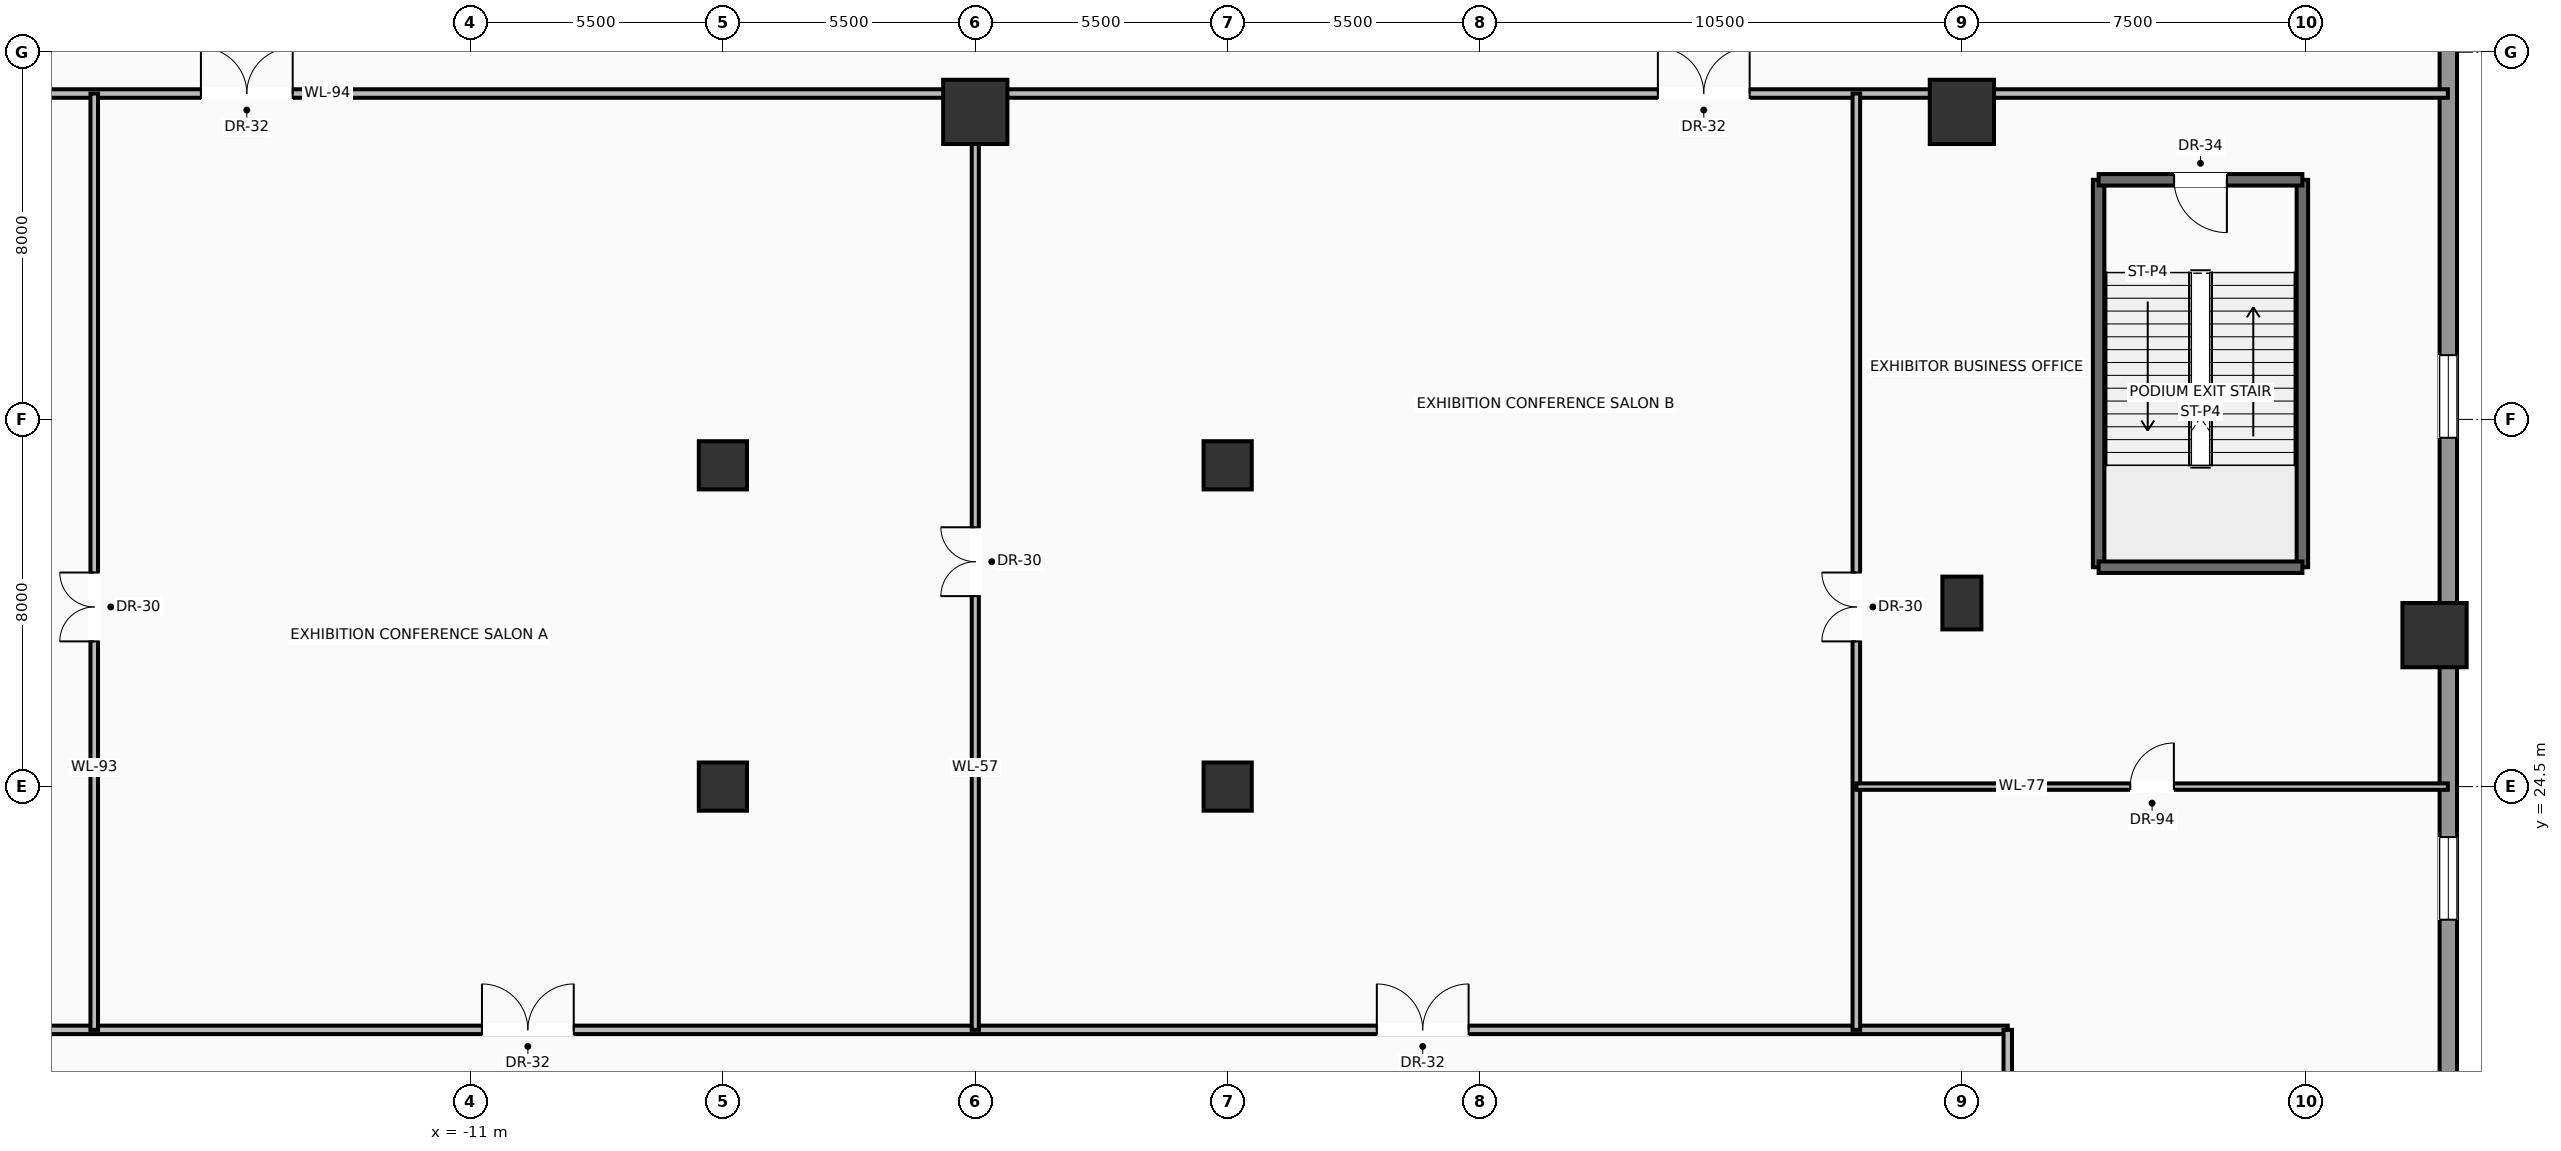
"""IFC4 building model, lengths in metres.
Left out: names, types, materials, properties, quantities, classifications, styles, units other than length and angle.
Written with IfcOpenShell. Run it as: python <this file> out.ifc"""

import sys

from ifc_helpers import new_model, si_unit, direction, frame, frame_2d, origin, origin_2d, place, context, subcontext, project, spatial, rectangle, hollow_rectangle, extrude, source, transform, mapped, element, fill, save


model = new_model("IFC4")
c1 = context("Model", 3, precision=1e-05, world=origin(), true_north=direction((0.0, 1.0)))
c2 = subcontext(c1, "Body", "Model", "MODEL_VIEW")
j1 = project(units=[si_unit("LENGTHUNIT", "METRE"), si_unit("PLANEANGLEUNIT", "RADIAN")], contexts=[c1])
p1 = place(None, origin())
s1 = spatial("IfcSite", under=j1, at=p1, CompositionType="ELEMENT")
p2 = place(p1, origin())
s2 = spatial("IfcBuilding", under=s1, at=p2, CompositionType="ELEMENT")
p3 = place(p2, frame((0.0, 0.0, 11.0)))
s3 = spatial("IfcBuildingStorey", under=s2, at=p3, CompositionType="ELEMENT", Elevation=11.0)
m1 = source(origin(), c2, "Body", "SweptSolid", [
    extrude(rectangle(XDim=1.05, YDim=1.05, at=origin_2d()), origin(), (0.0, 0.0, 1.0), 5.5),
])
for number, where, z_axis, x_axis in (
    (1, (-5.5, 24.5, 0.0), (0.0, 0.0, 1.0), (1.0, 0.0, 0.0)),
    (2, (5.5, 24.5, 0.0), (0.0, 0.0, 1.0), (1.0, 0.0, 0.0)),
    (3, (-5.5, 31.5, 0.0), (0.0, 0.0, 1.0), (1.0, 0.0, 0.0)),
    (4, (5.5, 31.5, 0.0), (0.0, 0.0, 1.0), (1.0, 0.0, 0.0)),
):
    element("IfcColumn", number, at=place(p3, frame(where, z_axis=z_axis, x_axis=x_axis)), inside=s3, PredefinedType="COLUMN", context=c2, shape_type="MappedRepresentation", body=[
        mapped(m1, transform((0.0, 0.0, 0.0), scale=1.0)),
    ])
m2 = source(origin(), c2, "Body", "SweptSolid", [
    extrude(rectangle(XDim=0.85, YDim=1.15, at=origin_2d()), origin(), (0.0, 0.0, 1.0), 5.5),
])
p4 = place(p3, frame((21.5, 28.5, 0.0), z_axis=(0.0, 0.0, 1.0), x_axis=(1.0, 0.0, 0.0)))
e5 = element("IfcColumn", 5, at=p4, inside=s3, PredefinedType="COLUMN", context=c2, shape_type="MappedRepresentation", body=[
    mapped(m2, transform((0.0, 0.0, 0.0), scale=1.0)),
])
m3 = source(origin(), c2, "Body", "SweptSolid", [
    extrude(hollow_rectangle(XDim=1.4, YDim=1.4, WallThickness=0.07, at=origin_2d()), origin(), (0.0, 0.0, 1.0), 5.5),
])
for number, where, z_axis, x_axis in (
    (6, (0.0, 39.2, 0.0), (0.0, 0.0, 1.0), (1.0, 0.0, 0.0)),
    (7, (21.5, 39.2, 0.0), (0.0, 0.0, 1.0), (1.0, 0.0, 0.0)),
    (8, (31.8, 27.8, 0.0), (0.0, 0.0, 1.0), (1.0, 0.0, 0.0)),
):
    element("IfcColumn", number, at=place(p3, frame(where, z_axis=z_axis, x_axis=x_axis)), inside=s3, PredefinedType="COLUMN", context=c2, shape_type="MappedRepresentation", body=[
        mapped(m3, transform((0.0, 0.0, 0.0), scale=1.0)),
    ])
p5 = place(p3, frame((32.1, 41.1, 0.0), z_axis=(0.0, 0.0, 1.0), x_axis=(0.0, -1.0, 0.0)))
e9 = element("IfcWall", 9, at=p5, inside=s3, PredefinedType="SOLIDWALL", context=c2, shape_type="SweptSolid", body=[
    extrude(rectangle(XDim=36.4, YDim=0.38, at=frame_2d((18.2, 0.0))), origin(), (0.0, 0.0, 1.0), 4.125),
])
p6 = place(p5, frame((17.7, 0.0, 0.95)))
e10 = element("IfcOpeningElement", 10, at=p6, cuts=e9, PredefinedType="OPENING", context=c2, shape_type="SweptSolid", body=[
    extrude(rectangle(XDim=1.8, YDim=2.4, at=frame_2d((0.9, 1.2))), frame((0.0, 0.2, 0.0), z_axis=(0.0, -1.0, 0.0), x_axis=(1.0, 0.0, 0.0)), (0.0, 0.0, 1.0), 0.4),
])
p7 = place(p5, frame((7.2, 0.0, 0.95)))
e11 = element("IfcOpeningElement", 11, at=p7, cuts=e9, PredefinedType="OPENING", context=c2, shape_type="SweptSolid", body=[
    extrude(rectangle(XDim=1.8, YDim=2.4, at=frame_2d((0.9, 1.2))), frame((0.0, 0.2, 0.0), z_axis=(0.0, -1.0, 0.0), x_axis=(1.0, 0.0, 0.0)), (0.0, 0.0, 1.0), 0.4),
])
for number, where, z_axis, x_axis in (
    (12, (24.48, 29.28, 0.0), (0.0, 0.0, 1.0), (0.0, 1.0, 0.0)),
    (13, (28.92, 29.28, 0.0), (0.0, 0.0, 1.0), (0.0, 1.0, 0.0)),
):
    element("IfcWall", number, at=place(p3, frame(where, z_axis=z_axis, x_axis=x_axis)), inside=s3, PredefinedType="SOLIDWALL", context=c2, shape_type="SweptSolid", body=[
        extrude(rectangle(XDim=8.44, YDim=0.25, at=frame_2d((4.22, 0.0))), origin(), (0.0, 0.0, 1.0), 5.185),
    ])
p8 = place(p3, frame((24.48, 29.28, 0.0), z_axis=(0.0, 0.0, 1.0), x_axis=(1.0, 0.0, 0.0)))
e14 = element("IfcWall", 14, at=p8, inside=s3, PredefinedType="SOLIDWALL", context=c2, shape_type="SweptSolid", body=[
    extrude(rectangle(XDim=4.44, YDim=0.25, at=frame_2d((2.22, 0.0))), origin(), (0.0, 0.0, 1.0), 5.185),
])
p9 = place(p3, frame((28.92, 37.72, 0.0), z_axis=(0.0, 0.0, 1.0), x_axis=(-1.0, 0.0, 0.0)))
e15 = element("IfcWall", 15, at=p9, inside=s3, PredefinedType="SOLIDWALL", context=c2, shape_type="SweptSolid", body=[
    extrude(rectangle(XDim=4.44, YDim=0.25, at=frame_2d((2.22, 0.0))), origin(), (0.0, 0.0, 1.0), 5.185),
])
p10 = place(p9, frame((1.645, 0.0, 0.0)))
e16 = element("IfcOpeningElement", 16, at=p10, cuts=e15, PredefinedType="OPENING", context=c2, shape_type="SweptSolid", body=[
    extrude(rectangle(XDim=1.15, YDim=2.2, at=frame_2d((0.575, 1.1))), frame((0.0, 0.135, 0.0), z_axis=(0.0, -1.0, 0.0), x_axis=(1.0, 0.0, 0.0)), (0.0, 0.0, 1.0), 0.27),
])
p11 = place(p3, frame((-32.09, 39.6, 0.0), z_axis=(0.0, 0.0, 1.0), x_axis=(1.0, 0.0, 0.0)))
e17 = element("IfcWall", 17, at=p11, inside=s3, PredefinedType="PARTITIONING", context=c2, shape_type="SweptSolid", body=[
    extrude(rectangle(XDim=64.18, YDim=0.185, at=frame_2d((32.09, 0.0))), origin(), (0.0, 0.0, 1.0), 4.137),
])
p12 = place(p11, frame((15.215, 0.0, 0.0)))
e18 = element("IfcOpeningElement", 18, at=p12, cuts=e17, PredefinedType="OPENING", context=c2, shape_type="SweptSolid", body=[
    extrude(rectangle(XDim=2.0, YDim=2.4, at=frame_2d((1.0, 1.2))), frame((0.0, 0.103, 0.0), z_axis=(0.0, -1.0, 0.0), x_axis=(1.0, 0.0, 0.0)), (0.0, 0.0, 1.0), 0.205),
])
p13 = place(p11, frame((46.965, 0.0, 0.0)))
e19 = element("IfcOpeningElement", 19, at=p13, cuts=e17, PredefinedType="OPENING", context=c2, shape_type="SweptSolid", body=[
    extrude(rectangle(XDim=2.0, YDim=2.4, at=frame_2d((1.0, 1.2))), frame((0.0, 0.103, 0.0), z_axis=(0.0, -1.0, 0.0), x_axis=(1.0, 0.0, 0.0)), (0.0, 0.0, 1.0), 0.205),
])
p14 = place(p3, frame((-22.5, 19.2, 0.0), z_axis=(0.0, 0.0, 1.0), x_axis=(1.0, 0.0, 0.0)))
e20 = element("IfcWall", 20, at=p14, inside=s3, PredefinedType="PARTITIONING", context=c2, shape_type="SweptSolid", body=[
    extrude(rectangle(XDim=45.0, YDim=0.185, at=frame_2d((22.5, 0.0))), origin(), (0.0, 0.0, 1.0), 4.137),
])
p15 = place(p14, frame((11.75, 0.0, 0.0)))
e21 = element("IfcOpeningElement", 21, at=p15, cuts=e20, PredefinedType="OPENING", context=c2, shape_type="SweptSolid", body=[
    extrude(rectangle(XDim=2.0, YDim=2.4, at=frame_2d((1.0, 1.2))), frame((0.0, 0.103, 0.0), z_axis=(0.0, -1.0, 0.0), x_axis=(1.0, 0.0, 0.0)), (0.0, 0.0, 1.0), 0.205),
])
p16 = place(p14, frame((31.25, 0.0, 0.0)))
e22 = element("IfcOpeningElement", 22, at=p16, cuts=e20, PredefinedType="OPENING", context=c2, shape_type="SweptSolid", body=[
    extrude(rectangle(XDim=2.0, YDim=2.4, at=frame_2d((1.0, 1.2))), frame((0.0, 0.103, 0.0), z_axis=(0.0, -1.0, 0.0), x_axis=(1.0, 0.0, 0.0)), (0.0, 0.0, 1.0), 0.205),
])
p17 = place(p3, frame((22.5, 16.55, 0.0), z_axis=(0.0, 0.0, 1.0), x_axis=(0.0, 1.0, 0.0)))
e23 = element("IfcWall", 23, at=p17, inside=s3, PredefinedType="PARTITIONING", context=c2, shape_type="SweptSolid", body=[
    extrude(rectangle(XDim=2.65, YDim=0.185, at=frame_2d((1.325, 0.0))), origin(), (0.0, 0.0, 1.0), 5.177),
])
p18 = place(p3, frame((-19.2, 19.2, 0.0), z_axis=(0.0, 0.0, 1.0), x_axis=(0.0, 1.0, 0.0)))
e24 = element("IfcWall", 24, at=p18, inside=s3, PredefinedType="PARTITIONING", context=c2, shape_type="SweptSolid", body=[
    extrude(rectangle(XDim=20.4, YDim=0.165, at=frame_2d((10.2, 0.0))), origin(), (0.0, 0.0, 1.0), 4.137),
])
p19 = place(p18, frame((8.464, 0.0, 0.0)))
e25 = element("IfcOpeningElement", 25, at=p19, cuts=e24, PredefinedType="OPENING", context=c2, shape_type="SweptSolid", body=[
    extrude(rectangle(XDim=1.5, YDim=2.25, at=frame_2d((0.75, 1.125))), frame((0.0, 0.093, 0.0), z_axis=(0.0, -1.0, 0.0), x_axis=(1.0, 0.0, 0.0)), (0.0, 0.0, 1.0), 0.185),
])
p20 = place(p3, frame((19.2, 19.2, 0.0), z_axis=(0.0, 0.0, 1.0), x_axis=(0.0, 1.0, 0.0)))
e26 = element("IfcWall", 26, at=p20, inside=s3, PredefinedType="PARTITIONING", context=c2, shape_type="SweptSolid", body=[
    extrude(rectangle(XDim=20.4, YDim=0.165, at=frame_2d((10.2, 0.0))), origin(), (0.0, 0.0, 1.0), 4.137),
])
p21 = place(p20, frame((8.464, 0.0, 0.0)))
e27 = element("IfcOpeningElement", 27, at=p21, cuts=e26, PredefinedType="OPENING", context=c2, shape_type="SweptSolid", body=[
    extrude(rectangle(XDim=1.5, YDim=2.25, at=frame_2d((0.75, 1.125))), frame((0.0, 0.093, 0.0), z_axis=(0.0, -1.0, 0.0), x_axis=(1.0, 0.0, 0.0)), (0.0, 0.0, 1.0), 0.185),
])
p22 = place(p3, frame((0.0, 19.2, 0.0), z_axis=(0.0, 0.0, 1.0), x_axis=(0.0, 1.0, 0.0)))
e28 = element("IfcWall", 28, at=p22, inside=s3, PredefinedType="MOVABLE", context=c2, shape_type="SweptSolid", body=[
    extrude(rectangle(XDim=20.4, YDim=0.155, at=frame_2d((10.2, 0.0))), origin(), (0.0, 0.0, 1.0), 4.137),
])
p23 = place(p22, frame((9.45, 0.0, 0.0)))
e29 = element("IfcOpeningElement", 29, at=p23, cuts=e28, PredefinedType="OPENING", context=c2, shape_type="SweptSolid", body=[
    extrude(rectangle(XDim=1.5, YDim=2.25, at=frame_2d((0.75, 1.125))), frame((0.0, 0.087, 0.0), z_axis=(0.0, -1.0, 0.0), x_axis=(1.0, 0.0, 0.0)), (0.0, 0.0, 1.0), 0.175),
])
p24 = place(p3, frame((19.2, 24.5, 0.0), z_axis=(0.0, 0.0, 1.0), x_axis=(1.0, 0.0, 0.0)))
e30 = element("IfcWall", 30, at=p24, inside=s3, PredefinedType="PARTITIONING", context=c2, shape_type="SweptSolid", body=[
    extrude(rectangle(XDim=12.89, YDim=0.14, at=frame_2d((6.445, 0.0))), origin(), (0.0, 0.0, 1.0), 4.25),
])
p25 = place(p24, frame((5.97, 0.0, 0.0)))
e31 = element("IfcOpeningElement", 31, at=p25, cuts=e30, PredefinedType="OPENING", context=c2, shape_type="SweptSolid", body=[
    extrude(rectangle(XDim=0.95, YDim=2.2, at=frame_2d((0.475, 1.1))), frame((0.0, 0.08, 0.0), z_axis=(0.0, -1.0, 0.0), x_axis=(1.0, 0.0, 0.0)), (0.0, 0.0, 1.0), 0.16),
])
m4 = source(origin(), c2, "Body", "SweptSolid", [
    extrude(rectangle(XDim=1.8, YDim=2.4, at=frame_2d((0.9, 1.2))), frame((0.0, 0.03, 0.0), z_axis=(0.0, -1.0, 0.0), x_axis=(1.0, 0.0, 0.0)), (0.0, 0.0, 1.0), 0.06),
])
p26 = place(p6, origin())
e32 = element("IfcWindow", 32, at=p26, inside=s3, PartitioningType="SINGLE_PANEL", PredefinedType="WINDOW", context=c2, shape_type="MappedRepresentation", body=[
    mapped(m4, transform((0.0, 0.0, 0.0), scale=1.0)),
])
fill(e10, e32)
p27 = place(p7, origin())
e33 = element("IfcWindow", 33, at=p27, inside=s3, PartitioningType="SINGLE_PANEL", PredefinedType="WINDOW", context=c2, shape_type="MappedRepresentation", body=[
    mapped(m4, transform((0.0, 0.0, 0.0), scale=1.0)),
])
fill(e11, e33)
m5 = source(origin(), c2, "Body", "SweptSolid", [
    extrude(rectangle(XDim=1.15, YDim=2.2, at=frame_2d((0.575, 1.1))), frame((0.0, 0.025, 0.0), z_axis=(0.0, -1.0, 0.0), x_axis=(1.0, 0.0, 0.0)), (0.0, 0.0, 1.0), 0.05),
])
p28 = place(p10, origin())
e34 = element("IfcDoor", 34, at=p28, inside=s3, OperationType="SINGLE_SWING_LEFT", PredefinedType="DOOR", context=c2, shape_type="MappedRepresentation", body=[
    mapped(m5, transform((0.0, 0.0, 0.0), scale=1.0)),
])
fill(e16, e34)
m6 = source(origin(), c2, "Body", "SweptSolid", [
    extrude(rectangle(XDim=2.0, YDim=2.4, at=frame_2d((1.0, 1.2))), frame((0.0, 0.025, 0.0), z_axis=(0.0, -1.0, 0.0), x_axis=(1.0, 0.0, 0.0)), (0.0, 0.0, 1.0), 0.05),
])
p29 = place(p12, origin())
e35 = element("IfcDoor", 35, at=p29, inside=s3, OperationType="DOUBLE_DOOR_SINGLE_SWING", PredefinedType="DOOR", context=c2, shape_type="MappedRepresentation", body=[
    mapped(m6, transform((0.0, 0.0, 0.0), scale=1.0)),
])
fill(e18, e35)
p30 = place(p13, origin())
e36 = element("IfcDoor", 36, at=p30, inside=s3, OperationType="DOUBLE_DOOR_SINGLE_SWING", PredefinedType="DOOR", context=c2, shape_type="MappedRepresentation", body=[
    mapped(m6, transform((0.0, 0.0, 0.0), scale=1.0)),
])
fill(e19, e36)
p31 = place(p15, origin())
e37 = element("IfcDoor", 37, at=p31, inside=s3, OperationType="DOUBLE_DOOR_SINGLE_SWING", PredefinedType="DOOR", context=c2, shape_type="MappedRepresentation", body=[
    mapped(m6, transform((0.0, 0.0, 0.0), scale=1.0)),
])
fill(e21, e37)
p32 = place(p16, origin())
e38 = element("IfcDoor", 38, at=p32, inside=s3, OperationType="DOUBLE_DOOR_SINGLE_SWING", PredefinedType="DOOR", context=c2, shape_type="MappedRepresentation", body=[
    mapped(m6, transform((0.0, 0.0, 0.0), scale=1.0)),
])
fill(e22, e38)
m7 = source(origin(), c2, "Body", "SweptSolid", [
    extrude(rectangle(XDim=1.5, YDim=2.25, at=frame_2d((0.75, 1.125))), frame((0.0, 0.025, 0.0), z_axis=(0.0, -1.0, 0.0), x_axis=(1.0, 0.0, 0.0)), (0.0, 0.0, 1.0), 0.05),
])
p33 = place(p19, origin())
e39 = element("IfcDoor", 39, at=p33, inside=s3, OperationType="DOUBLE_DOOR_SINGLE_SWING", PredefinedType="DOOR", context=c2, shape_type="MappedRepresentation", body=[
    mapped(m7, transform((0.0, 0.0, 0.0), scale=1.0)),
])
fill(e25, e39)
p34 = place(p21, origin())
e40 = element("IfcDoor", 40, at=p34, inside=s3, OperationType="DOUBLE_DOOR_SINGLE_SWING", PredefinedType="DOOR", context=c2, shape_type="MappedRepresentation", body=[
    mapped(m7, transform((0.0, 0.0, 0.0), scale=1.0)),
])
fill(e27, e40)
p35 = place(p23, origin())
e41 = element("IfcDoor", 41, at=p35, inside=s3, OperationType="DOUBLE_DOOR_SINGLE_SWING", PredefinedType="DOOR", context=c2, shape_type="MappedRepresentation", body=[
    mapped(m7, transform((0.0, 0.0, 0.0), scale=1.0)),
])
fill(e29, e41)
m8 = source(origin(), c2, "Body", "SweptSolid", [
    extrude(rectangle(XDim=0.95, YDim=2.2, at=frame_2d((0.475, 1.1))), frame((0.0, 0.025, 0.0), z_axis=(0.0, -1.0, 0.0), x_axis=(1.0, 0.0, 0.0)), (0.0, 0.0, 1.0), 0.05),
])
p36 = place(p25, origin())
e42 = element("IfcDoor", 42, at=p36, inside=s3, OperationType="SINGLE_SWING_RIGHT", PredefinedType="DOOR", context=c2, shape_type="MappedRepresentation", body=[
    mapped(m8, transform((0.0, 0.0, 0.0), scale=1.0)),
])
fill(e31, e42)
save(model, sys.argv[1])
